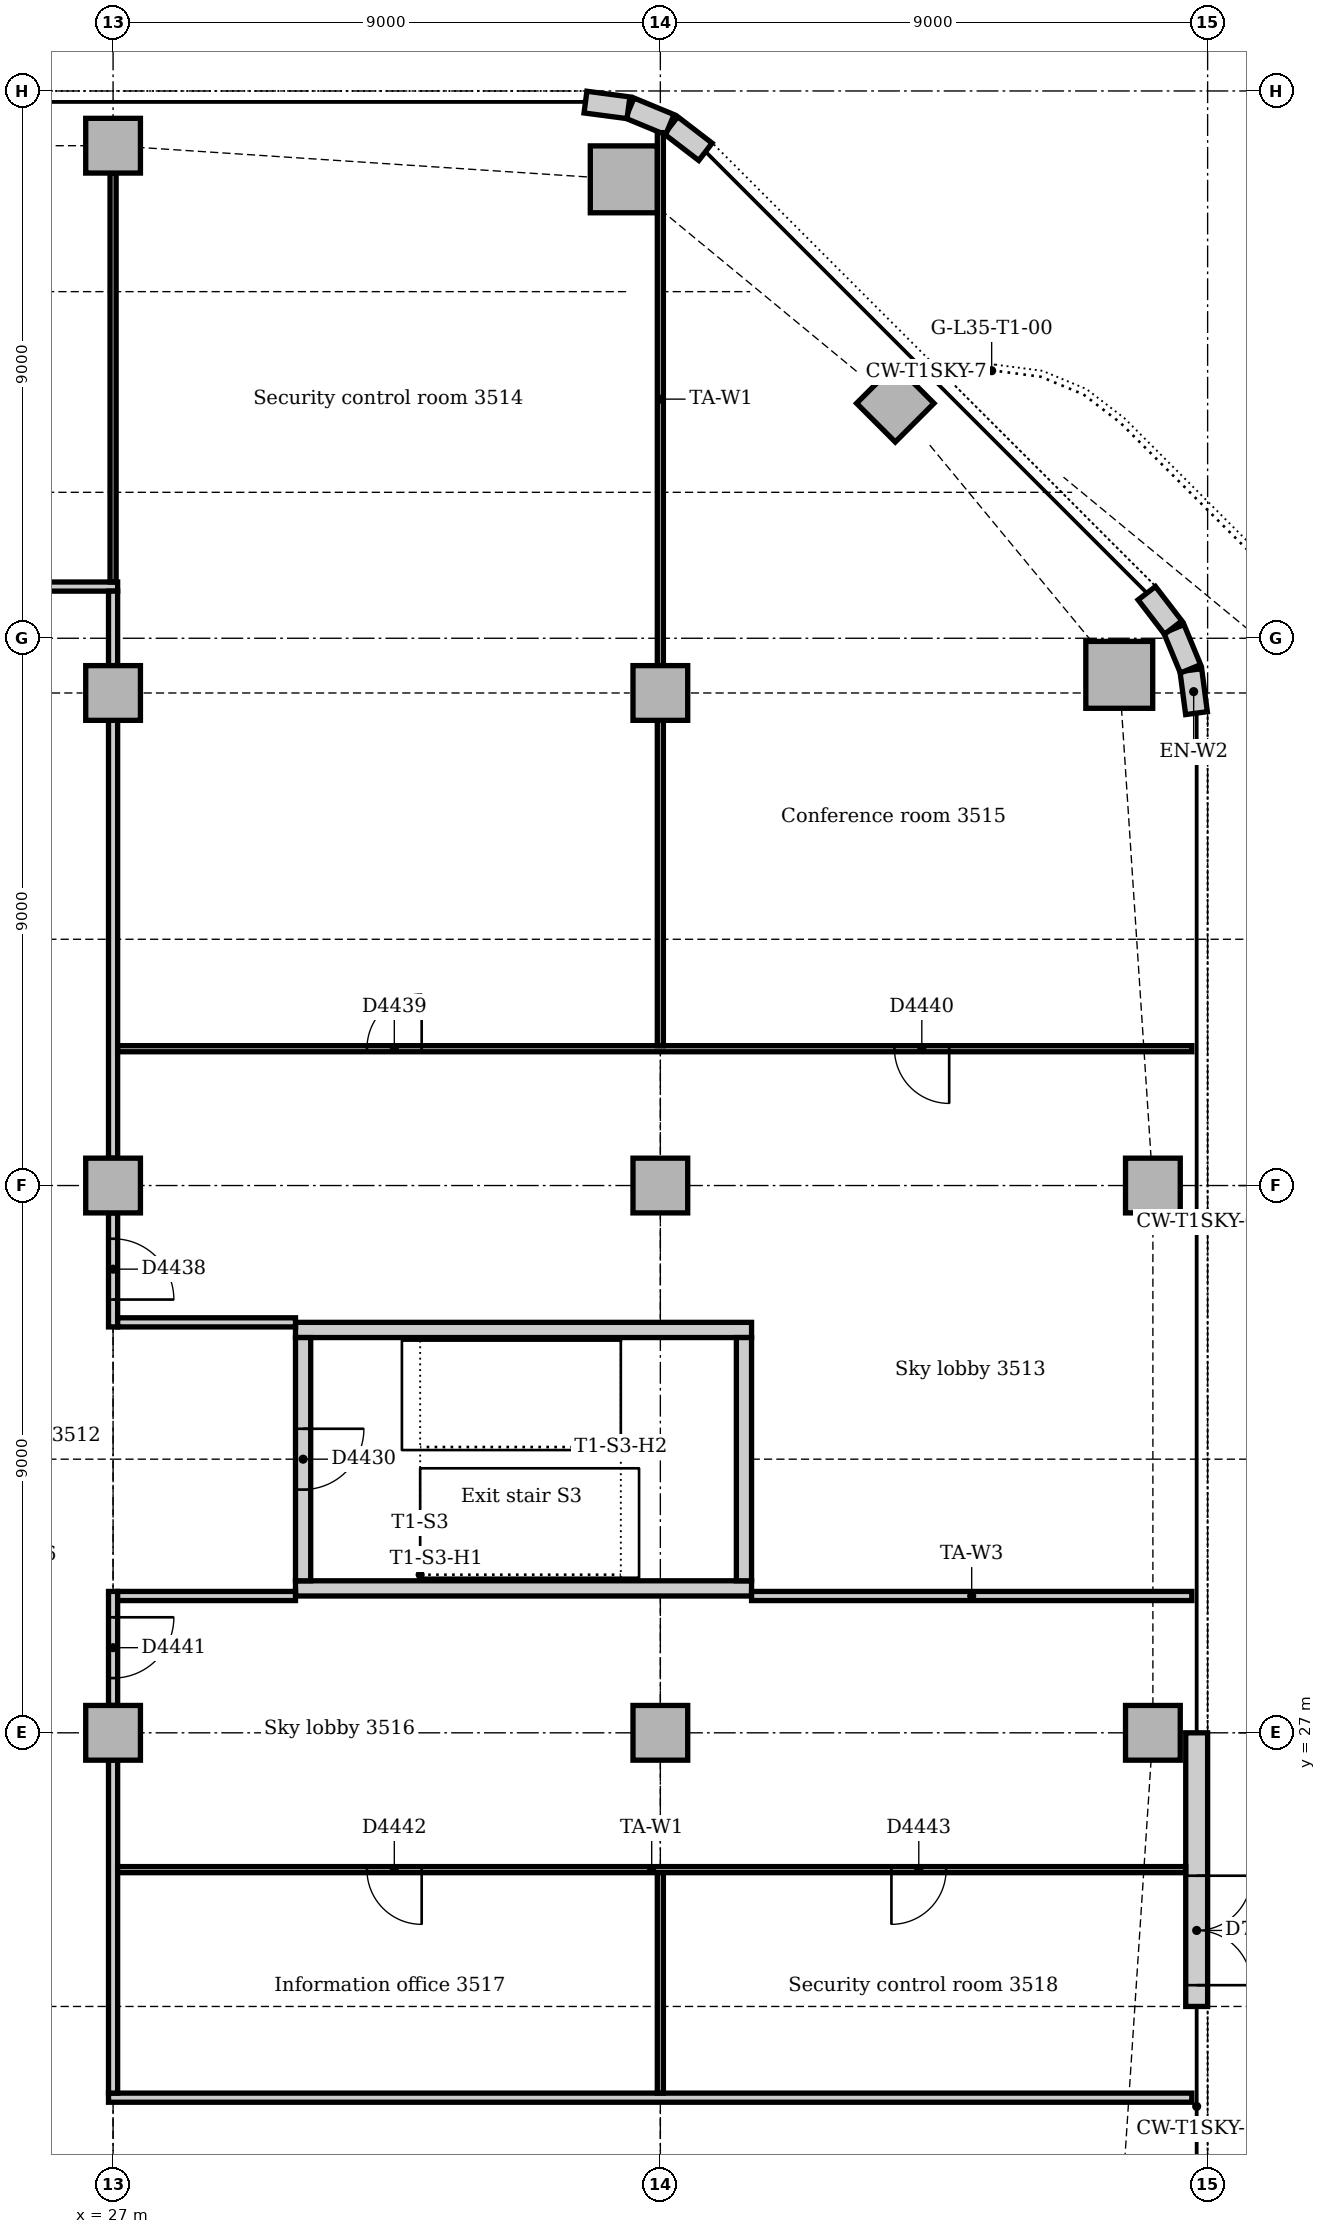
"""IFC4 building model, lengths in metres.
Left out: names, types, materials, properties, quantities, classifications, styles, units other than length and angle.
Written with IfcOpenShell. Run it as: python <this file> out.ifc"""

import sys

from ifc_helpers import new_model, si_unit, direction, frame, frame_2d, origin, origin_2d, place, context, subcontext, project, spatial, rectangle, extrude, element, fill, save


model = new_model("IFC4")
c1 = context("Model", 3, precision=1e-05, world=origin(), true_north=direction((0.0, 1.0)))
c2 = subcontext(c1, "Body", "Model", "MODEL_VIEW")
j1 = project(units=[si_unit("LENGTHUNIT", "METRE"), si_unit("PLANEANGLEUNIT", "RADIAN")], contexts=[c1])
p1 = place(None, origin())
s1 = spatial("IfcSite", under=j1, at=p1, CompositionType="ELEMENT")
p2 = place(p1, origin())
s2 = spatial("IfcBuilding", under=s1, at=p2, CompositionType="ELEMENT")
p3 = place(p2, frame((0.0, 0.0, 149.0)))
s3 = spatial("IfcBuildingStorey", under=s2, at=p3, CompositionType="ELEMENT", Elevation=149.0)
for number, where, z_axis, x_axis in (
    (1, (30.0, 29.375, 0.0), (0.0, 0.0, 1.0), (1.0, 0.0, 0.0)),
    (2, (37.5, 33.625, 0.0), (0.0, 0.0, 1.0), (-1.0, 0.0, 0.0)),
):
    element("IfcWall", number, at=place(p3, frame(where, z_axis=z_axis, x_axis=x_axis)), inside=s3, PredefinedType="SOLIDWALL", context=c2, shape_type="SweptSolid", body=[
        extrude(rectangle(XDim=7.5, YDim=0.25, at=frame_2d((3.75, 0.0))), origin(), (0.0, 0.0, 1.0), 4.0),
    ])
p4 = place(p3, frame((37.375, 29.5, 0.0), z_axis=(0.0, 0.0, 1.0), x_axis=(0.0, 1.0, 0.0)))
e3 = element("IfcWall", 3, at=p4, inside=s3, PredefinedType="SOLIDWALL", context=c2, shape_type="SweptSolid", body=[
    extrude(rectangle(XDim=4.0, YDim=0.25, at=frame_2d((2.0, 0.0))), origin(), (0.0, 0.0, 1.0), 4.0),
])
p5 = place(p3, frame((30.125, 33.5, 0.0), z_axis=(0.0, 0.0, 1.0), x_axis=(0.0, -1.0, 0.0)))
e4 = element("IfcWall", 4, at=p5, inside=s3, PredefinedType="SOLIDWALL", context=c2, shape_type="SweptSolid", body=[
    extrude(rectangle(XDim=4.0, YDim=0.25, at=frame_2d((2.0, 0.0))), origin(), (0.0, 0.0, 1.0), 4.0),
])
p6 = place(p5, frame((1.5, 0.0, 0.0)))
e5 = element("IfcOpeningElement", 5, at=p6, cuts=e4, PredefinedType="OPENING", context=c2, shape_type="SweptSolid", body=[
    extrude(rectangle(XDim=1.0, YDim=2.1, at=frame_2d((0.5, 1.05))), frame((0.0, 0.135, 0.0), z_axis=(0.0, -1.0, 0.0), x_axis=(1.0, 0.0, 0.0)), (0.0, 0.0, 1.0), 0.27),
])
for number, where, z_axis, x_axis in (
    (6, (43.547, 44.398, -0.15), (0.0, 0.0, 1.0), (1.0, 0.0, 0.0)),
    (7, (35.398, 52.547, -0.15), (0.0, 0.0, 1.0), (1.0, 0.0, 0.0)),
):
    element("IfcColumn", number, at=place(p3, frame(where, z_axis=z_axis, x_axis=x_axis)), inside=s3, PredefinedType="COLUMN", context=c2, shape_type="SweptSolid", body=[
        extrude(rectangle(XDim=1.1, YDim=1.1, at=origin_2d()), origin(), (0.0, 0.0, 1.0), 4.0),
    ])
for number, where, z_axis, x_axis in (
    (8, (44.1, 27.0, -0.15), (0.0, 0.0, 1.0), (1.0, 0.0, 0.0)),
    (9, (44.1, 36.0, -0.15), (0.0, 0.0, 1.0), (1.0, 0.0, 0.0)),
    (10, (39.864, 48.864, -0.15), (0.0, 0.0, 1.0), (0.707, 0.707, 0.0)),
    (11, (27.0, 53.1, -0.15), (0.0, 0.0, 1.0), (1.0, 0.0, 0.0)),
):
    element("IfcColumn", number, at=place(p3, frame(where, z_axis=z_axis, x_axis=x_axis)), inside=s3, PredefinedType="COLUMN", context=c2, shape_type="SweptSolid", body=[
        extrude(rectangle(XDim=0.9, YDim=0.9, at=origin_2d()), origin(), (0.0, 0.0, 1.0), 4.0),
    ])
for number, where, z_axis, x_axis in (
    (12, (27.0, 27.0, 0.0), (0.0, 0.0, 1.0), (1.0, 0.0, 0.0)),
    (13, (27.0, 36.0, 0.0), (0.0, 0.0, 1.0), (1.0, 0.0, 0.0)),
    (14, (27.0, 44.1, 0.0), (0.0, 0.0, 1.0), (1.0, 0.0, 0.0)),
    (15, (36.0, 27.0, 0.0), (0.0, 0.0, 1.0), (1.0, 0.0, 0.0)),
    (16, (36.0, 36.0, 0.0), (0.0, 0.0, 1.0), (1.0, 0.0, 0.0)),
    (17, (36.0, 44.1, 0.0), (0.0, 0.0, 1.0), (1.0, 0.0, 0.0)),
):
    element("IfcColumn", number, at=place(p3, frame(where, z_axis=z_axis, x_axis=x_axis)), inside=s3, PredefinedType="COLUMN", context=c2, shape_type="SweptSolid", body=[
        extrude(rectangle(XDim=0.9, YDim=0.9, at=origin_2d()), origin(), (0.0, 0.0, 1.0), 3.85),
    ])
p7 = place(p3, frame((44.82, 22.5, 0.0), z_axis=(0.0, 0.0, 1.0), x_axis=(0.0, 1.0, 0.0)))
e18 = element("IfcWall", 18, at=p7, inside=s3, PredefinedType="STANDARD", context=c2, shape_type="SweptSolid", body=[
    extrude(rectangle(XDim=4.5, YDim=0.36, at=frame_2d((2.25, 0.0))), origin(), (0.0, 0.0, 1.0), 3.85),
])
p8 = place(p7, frame((0.35, 0.0, 0.0)))
e19 = element("IfcOpeningElement", 19, at=p8, cuts=e18, PredefinedType="OPENING", context=c2, shape_type="SweptSolid", body=[
    extrude(rectangle(XDim=1.8, YDim=2.4, at=frame_2d((0.9, 1.2))), frame((0.0, 0.19, 0.0), z_axis=(0.0, -1.0, 0.0), x_axis=(1.0, 0.0, 0.0)), (0.0, 0.0, 1.0), 0.38),
])
for number, where, z_axis, x_axis in (
    (20, (44.817, 43.769, 0.0), (0.0, 0.0, 1.0), (-0.131, 0.991, 0.0)),
    (21, (44.718, 44.497, 0.0), (0.0, 0.0, 1.0), (-0.383, 0.924, 0.0)),
):
    element("IfcWall", number, at=place(p3, frame(where, z_axis=z_axis, x_axis=x_axis)), inside=s3, PredefinedType="STANDARD", context=c2, shape_type="SweptSolid", body=[
        extrude(rectangle(XDim=0.713, YDim=0.36, at=frame_2d((0.356, 0.0))), origin(), (0.0, 0.0, 1.0), 3.85),
    ])
for number, where, z_axis, x_axis in (
    (22, (44.434, 45.175, 0.0), (0.0, 0.0, 1.0), (-0.609, 0.793, 0.0)),
    (23, (36.741, 53.0, 0.0), (0.0, 0.0, 1.0), (-0.793, 0.609, 0.0)),
):
    element("IfcWall", number, at=place(p3, frame(where, z_axis=z_axis, x_axis=x_axis)), inside=s3, PredefinedType="STANDARD", context=c2, shape_type="SweptSolid", body=[
        extrude(rectangle(XDim=0.713, YDim=0.36, at=frame_2d((0.357, 0.0))), origin(), (0.0, 0.0, 1.0), 3.85),
    ])
for number, where, z_axis, x_axis in (
    (24, (36.156, 53.445, 0.0), (0.0, 0.0, 1.0), (-0.924, 0.383, 0.0)),
    (25, (35.476, 53.724, 0.0), (0.0, 0.0, 1.0), (-0.991, 0.131, 0.0)),
):
    element("IfcWall", number, at=place(p3, frame(where, z_axis=z_axis, x_axis=x_axis)), inside=s3, PredefinedType="STANDARD", context=c2, shape_type="SweptSolid", body=[
        extrude(rectangle(XDim=0.713, YDim=0.36, at=frame_2d((0.356, 0.0))), origin(), (0.0, 0.0, 1.0), 3.85),
    ])
p9 = place(p3, frame((1.903, 45.85, 0.0), z_axis=(0.0, 0.0, 1.0), x_axis=(1.0, 0.0, 0.0)))
e26 = element("IfcWall", 26, at=p9, inside=s3, PredefinedType="PARTITIONING", context=c2, shape_type="SweptSolid", body=[
    extrude(rectangle(XDim=25.172, YDim=0.15, at=frame_2d((12.586, 0.0))), origin(), (0.0, 0.0, 1.0), 3.85),
])
p10 = place(p9, frame((5.4, 0.0, 0.0)))
e27 = element("IfcOpeningElement", 27, at=p10, cuts=e26, PredefinedType="OPENING", context=c2, shape_type="SweptSolid", body=[
    extrude(rectangle(XDim=0.9, YDim=2.1, at=frame_2d((0.45, 1.05))), frame((0.0, 0.085, 0.0), z_axis=(0.0, -1.0, 0.0), x_axis=(1.0, 0.0, 0.0)), (0.0, 0.0, 1.0), 0.17),
])
p11 = place(p9, frame((15.647, 0.0, 0.0)))
e28 = element("IfcOpeningElement", 28, at=p11, cuts=e26, PredefinedType="OPENING", context=c2, shape_type="SweptSolid", body=[
    extrude(rectangle(XDim=0.9, YDim=2.1, at=frame_2d((0.45, 1.05))), frame((0.0, 0.085, 0.0), z_axis=(0.0, -1.0, 0.0), x_axis=(1.0, 0.0, 0.0)), (0.0, 0.0, 1.0), 0.17),
])
p12 = place(p3, frame((26.925, 21.0, 0.0), z_axis=(0.0, 0.0, 1.0), x_axis=(1.0, 0.0, 0.0)))
e29 = element("IfcWall", 29, at=p12, inside=s3, PredefinedType="PARTITIONING", context=c2, shape_type="SweptSolid", body=[
    extrude(rectangle(XDim=17.815, YDim=0.15, at=frame_2d((8.908, 0.0))), origin(), (0.0, 0.0, 1.0), 3.85),
])
p13 = place(p3, frame((27.0, 33.675, 0.0), z_axis=(0.0, 0.0, 1.0), x_axis=(0.0, 1.0, 0.0)))
e30 = element("IfcWall", 30, at=p13, inside=s3, PredefinedType="PARTITIONING", context=c2, shape_type="SweptSolid", body=[
    extrude(rectangle(XDim=1.875, YDim=0.15, at=frame_2d((0.938, 0.0))), origin(), (0.0, 0.0, 1.0), 3.362),
])
p14 = place(p13, frame((0.45, 0.0, 0.0)))
e31 = element("IfcOpeningElement", 31, at=p14, cuts=e30, PredefinedType="OPENING", context=c2, shape_type="SweptSolid", body=[
    extrude(rectangle(XDim=1.0, YDim=2.1, at=frame_2d((0.5, 1.05))), frame((0.0, 0.085, 0.0), z_axis=(0.0, -1.0, 0.0), x_axis=(1.0, 0.0, 0.0)), (0.0, 0.0, 1.0), 0.17),
])
p15 = place(p3, frame((27.0, 36.45, 0.0), z_axis=(0.0, 0.0, 1.0), x_axis=(0.0, 1.0, 0.0)))
e32 = element("IfcWall", 32, at=p15, inside=s3, PredefinedType="PARTITIONING", context=c2, shape_type="SweptSolid", body=[
    extrude(rectangle(XDim=7.2, YDim=0.15, at=frame_2d((3.6, 0.0))), origin(), (0.0, 0.0, 1.0), 3.362),
])
p16 = place(p3, frame((27.0, 44.55, 0.0), z_axis=(0.0, 0.0, 1.0), x_axis=(0.0, 1.0, 0.0)))
e33 = element("IfcWall", 33, at=p16, inside=s3, PredefinedType="PARTITIONING", context=c2, shape_type="SweptSolid", body=[
    extrude(rectangle(XDim=1.225, YDim=0.15, at=frame_2d((0.613, 0.0))), origin(), (0.0, 0.0, 1.0), 3.362),
])
p17 = place(p3, frame((27.0, 21.075, 0.0), z_axis=(0.0, 0.0, 1.0), x_axis=(0.0, 1.0, 0.0)))
e34 = element("IfcWall", 34, at=p17, inside=s3, PredefinedType="PARTITIONING", context=c2, shape_type="SweptSolid", body=[
    extrude(rectangle(XDim=5.475, YDim=0.15, at=frame_2d((2.737, 0.0))), origin(), (0.0, 0.0, 1.0), 3.362),
])
p18 = place(p3, frame((27.0, 27.45, 0.0), z_axis=(0.0, 0.0, 1.0), x_axis=(0.0, 1.0, 0.0)))
e35 = element("IfcWall", 35, at=p18, inside=s3, PredefinedType="PARTITIONING", context=c2, shape_type="SweptSolid", body=[
    extrude(rectangle(XDim=1.875, YDim=0.15, at=frame_2d((0.938, 0.0))), origin(), (0.0, 0.0, 1.0), 3.362),
])
p19 = place(p18, frame((0.45, 0.0, 0.0)))
e36 = element("IfcOpeningElement", 36, at=p19, cuts=e35, PredefinedType="OPENING", context=c2, shape_type="SweptSolid", body=[
    extrude(rectangle(XDim=1.0, YDim=2.1, at=frame_2d((0.5, 1.05))), frame((0.0, 0.085, 0.0), z_axis=(0.0, -1.0, 0.0), x_axis=(1.0, 0.0, 0.0)), (0.0, 0.0, 1.0), 0.17),
])
for number, where, z_axis, x_axis in (
    (37, (27.075, 29.25, 0.0), (0.0, 0.0, 1.0), (1.0, 0.0, 0.0)),
    (38, (27.075, 33.75, 0.0), (0.0, 0.0, 1.0), (1.0, 0.0, 0.0)),
):
    element("IfcWall", number, at=place(p3, frame(where, z_axis=z_axis, x_axis=x_axis)), inside=s3, PredefinedType="PARTITIONING", context=c2, shape_type="SweptSolid", body=[
        extrude(rectangle(XDim=2.925, YDim=0.15, at=frame_2d((1.462, 0.0))), origin(), (0.0, 0.0, 1.0), 3.85),
    ])
p20 = place(p3, frame((37.5, 29.25, 0.0), z_axis=(0.0, 0.0, 1.0), x_axis=(1.0, 0.0, 0.0)))
e39 = element("IfcWall", 39, at=p20, inside=s3, PredefinedType="PARTITIONING", context=c2, shape_type="SweptSolid", body=[
    extrude(rectangle(XDim=7.24, YDim=0.15, at=frame_2d((3.62, 0.0))), origin(), (0.0, 0.0, 1.0), 3.85),
])
p21 = place(p3, frame((27.075, 24.75, 0.0), z_axis=(0.0, 0.0, 1.0), x_axis=(1.0, 0.0, 0.0)))
e40 = element("IfcWall", 40, at=p21, inside=s3, PredefinedType="PARTITIONING", context=c2, shape_type="SweptSolid", body=[
    extrude(rectangle(XDim=17.565, YDim=0.1, at=frame_2d((8.783, 0.0))), origin(), (0.0, 0.0, 1.0), 3.85),
])
p22 = place(p21, frame((4.1, 0.0, 0.0)))
e41 = element("IfcOpeningElement", 41, at=p22, cuts=e40, PredefinedType="OPENING", context=c2, shape_type="SweptSolid", body=[
    extrude(rectangle(XDim=0.9, YDim=2.1, at=frame_2d((0.45, 1.05))), frame((0.0, 0.06, 0.0), z_axis=(0.0, -1.0, 0.0), x_axis=(1.0, 0.0, 0.0)), (0.0, 0.0, 1.0), 0.12),
])
p23 = place(p21, frame((12.725, 0.0, 0.0)))
e42 = element("IfcOpeningElement", 42, at=p23, cuts=e40, PredefinedType="OPENING", context=c2, shape_type="SweptSolid", body=[
    extrude(rectangle(XDim=0.9, YDim=2.1, at=frame_2d((0.45, 1.05))), frame((0.0, 0.06, 0.0), z_axis=(0.0, -1.0, 0.0), x_axis=(1.0, 0.0, 0.0)), (0.0, 0.0, 1.0), 0.12),
])
p24 = place(p3, frame((27.075, 38.25, 0.0), z_axis=(0.0, 0.0, 1.0), x_axis=(1.0, 0.0, 0.0)))
e43 = element("IfcWall", 43, at=p24, inside=s3, PredefinedType="PARTITIONING", context=c2, shape_type="SweptSolid", body=[
    extrude(rectangle(XDim=17.665, YDim=0.1, at=frame_2d((8.832, 0.0))), origin(), (0.0, 0.0, 1.0), 3.85),
])
p25 = place(p24, frame((4.1, 0.0, 0.0)))
e44 = element("IfcOpeningElement", 44, at=p25, cuts=e43, PredefinedType="OPENING", context=c2, shape_type="SweptSolid", body=[
    extrude(rectangle(XDim=0.9, YDim=2.1, at=frame_2d((0.45, 1.05))), frame((0.0, 0.06, 0.0), z_axis=(0.0, -1.0, 0.0), x_axis=(1.0, 0.0, 0.0)), (0.0, 0.0, 1.0), 0.12),
])
p26 = place(p24, frame((12.775, 0.0, 0.0)))
e45 = element("IfcOpeningElement", 45, at=p26, cuts=e43, PredefinedType="OPENING", context=c2, shape_type="SweptSolid", body=[
    extrude(rectangle(XDim=0.9, YDim=2.1, at=frame_2d((0.45, 1.05))), frame((0.0, 0.06, 0.0), z_axis=(0.0, -1.0, 0.0), x_axis=(1.0, 0.0, 0.0)), (0.0, 0.0, 1.0), 0.12),
])
p27 = place(p3, frame((36.0, 38.3, 0.0), z_axis=(0.0, 0.0, 1.0), x_axis=(0.0, 1.0, 0.0)))
e46 = element("IfcWall", 46, at=p27, inside=s3, PredefinedType="PARTITIONING", context=c2, shape_type="SweptSolid", body=[
    extrude(rectangle(XDim=5.35, YDim=0.1, at=frame_2d((2.675, 0.0))), origin(), (0.0, 0.0, 1.0), 3.362),
])
p28 = place(p3, frame((36.0, 44.55, 0.0), z_axis=(0.0, 0.0, 1.0), x_axis=(0.0, 1.0, 0.0)))
e47 = element("IfcWall", 47, at=p28, inside=s3, PredefinedType="PARTITIONING", context=c2, shape_type="SweptSolid", body=[
    extrude(rectangle(XDim=8.765, YDim=0.1, at=frame_2d((4.383, 0.0))), origin(), (0.0, 0.0, 1.0), 3.362),
])
p29 = place(p3, frame((27.0, 45.925, 0.0), z_axis=(0.0, 0.0, 1.0), x_axis=(0.0, 1.0, 0.0)))
e48 = element("IfcWall", 48, at=p29, inside=s3, PredefinedType="PARTITIONING", context=c2, shape_type="SweptSolid", body=[
    extrude(rectangle(XDim=6.725, YDim=0.1, at=frame_2d((3.362, 0.0))), origin(), (0.0, 0.0, 1.0), 3.362),
])
p30 = place(p3, frame((36.0, 21.075, 0.0), z_axis=(0.0, 0.0, 1.0), x_axis=(0.0, 1.0, 0.0)))
e49 = element("IfcWall", 49, at=p30, inside=s3, PredefinedType="PARTITIONING", context=c2, shape_type="SweptSolid", body=[
    extrude(rectangle(XDim=3.625, YDim=0.1, at=frame_2d((1.812, 0.0))), origin(), (0.0, 0.0, 1.0), 3.362),
])
p31 = place(p8, frame((1.8, 0.0, 0.0), z_axis=(0.0, 0.0, 1.0), x_axis=(-1.0, 0.0, 0.0)))
e50 = element("IfcDoor", 50, at=p31, inside=s3, OperationType="DOUBLE_DOOR_SINGLE_SWING", PredefinedType="DOOR", context=c2, shape_type="SweptSolid", body=[
    extrude(rectangle(XDim=1.8, YDim=2.4, at=frame_2d((0.9, 1.2))), frame((0.0, -0.07, 0.0), z_axis=(0.0, -1.0, 0.0), x_axis=(1.0, 0.0, 0.0)), (0.0, 0.0, 1.0), 0.05),
])
fill(e19, e50)
p32 = place(p6, origin())
e51 = element("IfcDoor", 51, at=p32, inside=s3, OperationType="SINGLE_SWING_LEFT", PredefinedType="DOOR", context=c2, shape_type="SweptSolid", body=[
    extrude(rectangle(XDim=1.0, YDim=2.1, at=frame_2d((0.5, 1.05))), frame((0.0, 0.025, 0.0), z_axis=(0.0, -1.0, 0.0), x_axis=(1.0, 0.0, 0.0)), (0.0, 0.0, 1.0), 0.05),
])
fill(e5, e51)
p33 = place(p14, frame((1.0, 0.0, 0.0), z_axis=(0.0, 0.0, 1.0), x_axis=(-1.0, 0.0, 0.0)))
e52 = element("IfcDoor", 52, at=p33, inside=s3, OperationType="SINGLE_SWING_RIGHT", PredefinedType="DOOR", context=c2, shape_type="SweptSolid", body=[
    extrude(rectangle(XDim=1.0, YDim=2.1, at=frame_2d((0.5, 1.05))), frame((0.0, 0.025, 0.0), z_axis=(0.0, -1.0, 0.0), x_axis=(1.0, 0.0, 0.0)), (0.0, 0.0, 1.0), 0.05),
])
fill(e31, e52)
p34 = place(p25, origin())
e53 = element("IfcDoor", 53, at=p34, inside=s3, OperationType="SINGLE_SWING_RIGHT", PredefinedType="DOOR", context=c2, shape_type="SweptSolid", body=[
    extrude(rectangle(XDim=0.9, YDim=2.1, at=frame_2d((0.45, 1.05))), frame((0.0, 0.025, 0.0), z_axis=(0.0, -1.0, 0.0), x_axis=(1.0, 0.0, 0.0)), (0.0, 0.0, 1.0), 0.05),
])
fill(e44, e53)
p35 = place(p26, frame((0.9, 0.0, 0.0), z_axis=(0.0, 0.0, 1.0), x_axis=(-1.0, 0.0, 0.0)))
e54 = element("IfcDoor", 54, at=p35, inside=s3, OperationType="SINGLE_SWING_LEFT", PredefinedType="DOOR", context=c2, shape_type="SweptSolid", body=[
    extrude(rectangle(XDim=0.9, YDim=2.1, at=frame_2d((0.45, 1.05))), frame((0.0, 0.025, 0.0), z_axis=(0.0, -1.0, 0.0), x_axis=(1.0, 0.0, 0.0)), (0.0, 0.0, 1.0), 0.05),
])
fill(e45, e54)
p36 = place(p19, frame((1.0, 0.0, 0.0), z_axis=(0.0, 0.0, 1.0), x_axis=(-1.0, 0.0, 0.0)))
e55 = element("IfcDoor", 55, at=p36, inside=s3, OperationType="SINGLE_SWING_LEFT", PredefinedType="DOOR", context=c2, shape_type="SweptSolid", body=[
    extrude(rectangle(XDim=1.0, YDim=2.1, at=frame_2d((0.5, 1.05))), frame((0.0, 0.025, 0.0), z_axis=(0.0, -1.0, 0.0), x_axis=(1.0, 0.0, 0.0)), (0.0, 0.0, 1.0), 0.05),
])
fill(e36, e55)
p37 = place(p22, frame((0.9, 0.0, 0.0), z_axis=(0.0, 0.0, 1.0), x_axis=(-1.0, 0.0, 0.0)))
e56 = element("IfcDoor", 56, at=p37, inside=s3, OperationType="SINGLE_SWING_LEFT", PredefinedType="DOOR", context=c2, shape_type="SweptSolid", body=[
    extrude(rectangle(XDim=0.9, YDim=2.1, at=frame_2d((0.45, 1.05))), frame((0.0, 0.025, 0.0), z_axis=(0.0, -1.0, 0.0), x_axis=(1.0, 0.0, 0.0)), (0.0, 0.0, 1.0), 0.05),
])
fill(e41, e56)
p38 = place(p23, frame((0.9, 0.0, 0.0), z_axis=(0.0, 0.0, 1.0), x_axis=(-1.0, 0.0, 0.0)))
e57 = element("IfcDoor", 57, at=p38, inside=s3, OperationType="SINGLE_SWING_RIGHT", PredefinedType="DOOR", context=c2, shape_type="SweptSolid", body=[
    extrude(rectangle(XDim=0.9, YDim=2.1, at=frame_2d((0.45, 1.05))), frame((0.0, 0.025, 0.0), z_axis=(0.0, -1.0, 0.0), x_axis=(1.0, 0.0, 0.0)), (0.0, 0.0, 1.0), 0.05),
])
fill(e42, e57)
save(model, sys.argv[1])
